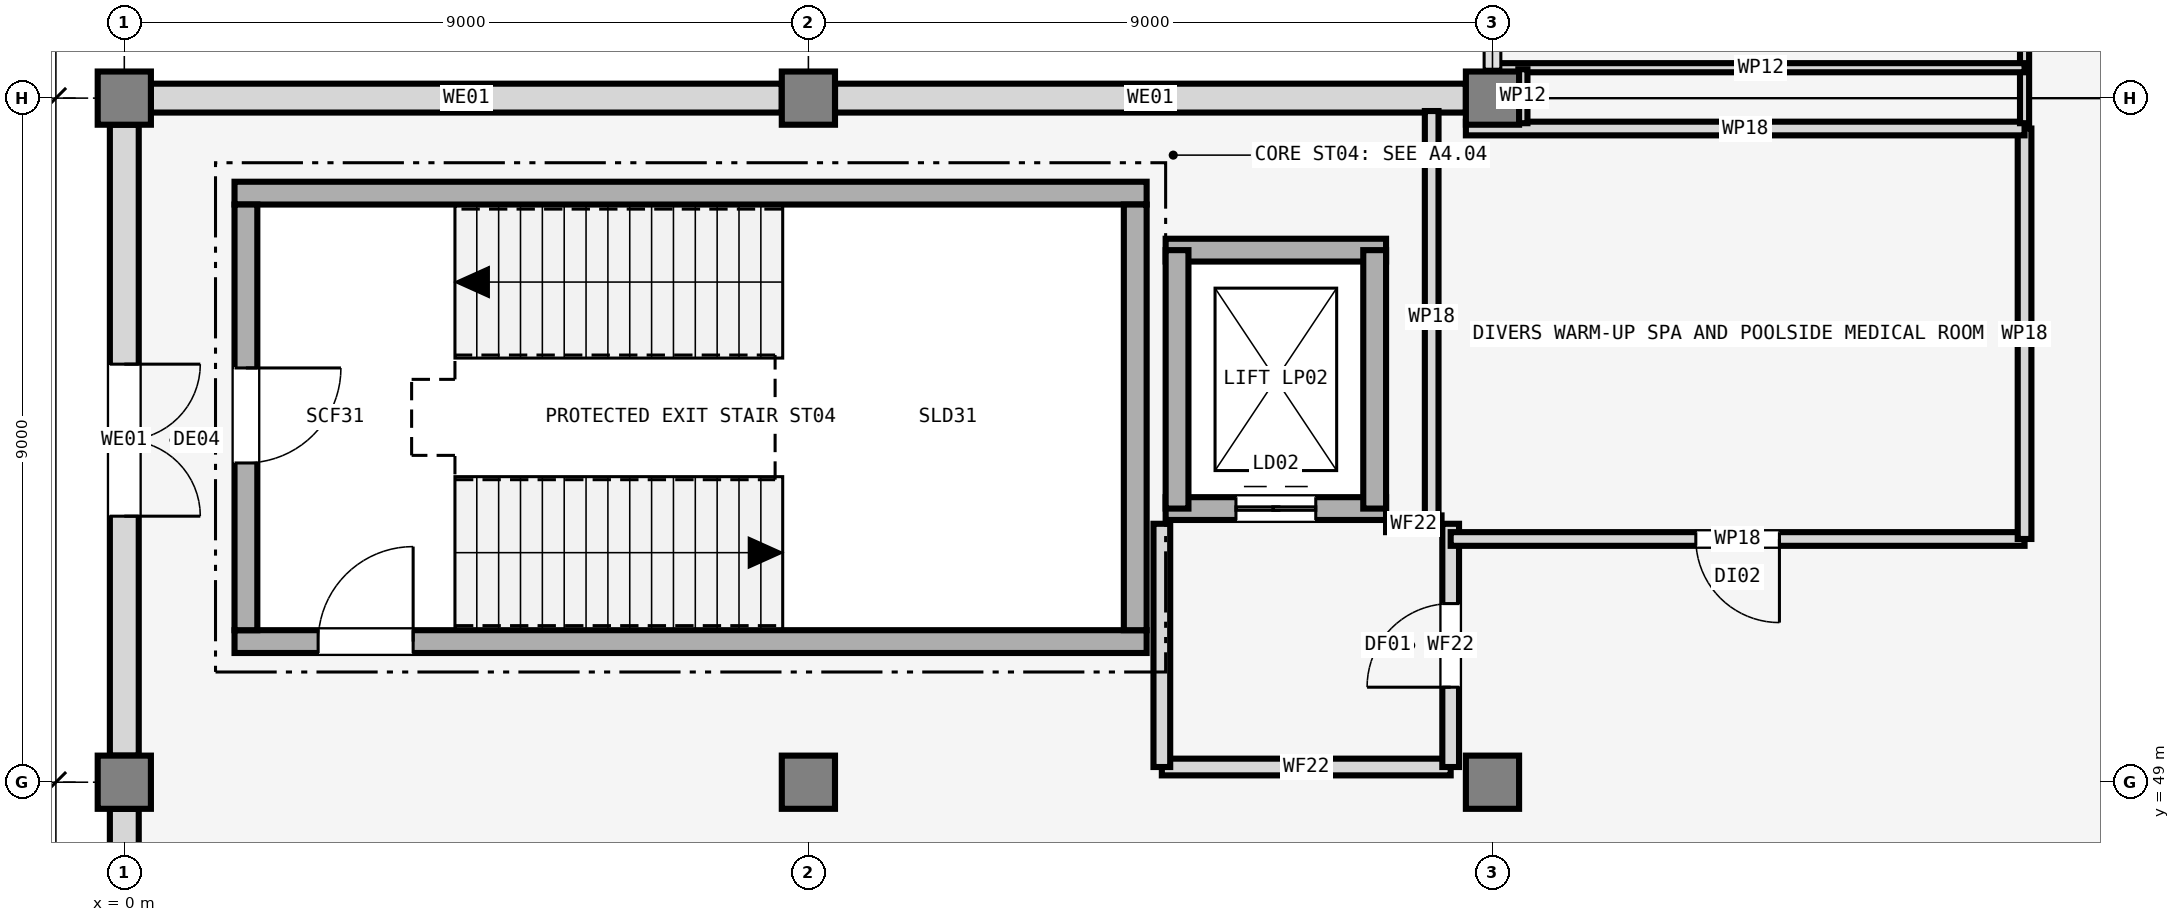
"""IFC4 building model, lengths in metres.
Left out: names, types, materials, properties, quantities, classifications, styles, units other than length and angle.
Written with IfcOpenShell. Run it as: python <this file> out.ifc"""

import sys

from ifc_helpers import new_model, si_unit, direction, frame, frame_2d, origin, origin_2d, place, context, subcontext, project, spatial, rectangle, extrude, element, fill, save


model = new_model("IFC4")
c1 = context("Model", 3, precision=1e-05, world=origin(), true_north=direction((0.0, 1.0)))
c2 = subcontext(c1, "Body", "Model", "MODEL_VIEW")
j1 = project(units=[si_unit("LENGTHUNIT", "METRE"), si_unit("PLANEANGLEUNIT", "RADIAN")], contexts=[c1])
p1 = place(None, origin())
s1 = spatial("IfcSite", under=j1, at=p1, CompositionType="ELEMENT")
p2 = place(p1, origin())
s2 = spatial("IfcBuilding", under=s1, at=p2, CompositionType="ELEMENT")
p3 = place(p2, origin())
s3 = spatial("IfcBuildingStorey", under=s2, at=p3, CompositionType="ELEMENT", Elevation=0.0)
for number, where, z_axis, x_axis in (
    (1, (0.0, 49.0, 0.0), (0.0, 0.0, 1.0), (1.0, 0.0, 0.0)),
    (2, (0.0, 58.0, 0.0), (0.0, 0.0, 1.0), (1.0, 0.0, 0.0)),
    (3, (9.0, 49.0, 0.0), (0.0, 0.0, 1.0), (1.0, 0.0, 0.0)),
    (4, (9.0, 58.0, 0.0), (0.0, 0.0, 1.0), (1.0, 0.0, 0.0)),
    (5, (18.0, 49.0, 0.0), (0.0, 0.0, 1.0), (1.0, 0.0, 0.0)),
    (6, (18.0, 58.0, 0.0), (0.0, 0.0, 1.0), (1.0, 0.0, 0.0)),
):
    element("IfcColumn", number, at=place(p3, frame(where, z_axis=z_axis, x_axis=x_axis)), inside=s3, PredefinedType="COLUMN", context=c2, shape_type="SweptSolid", body=[
        extrude(rectangle(XDim=0.7, YDim=0.7, at=origin_2d()), origin(), (0.0, 0.0, 1.0), 4.8),
    ])
p4 = place(p3, frame((0.0, 48.65, 0.0), z_axis=(0.0, 0.0, 1.0), x_axis=(0.0, -1.0, 0.0)))
e7 = element("IfcWall", 7, at=p4, inside=s3, PredefinedType="SOLIDWALL", context=c2, shape_type="SweptSolid", body=[
    extrude(rectangle(XDim=8.3, YDim=0.38, at=frame_2d((4.15, 0.0))), origin(), (0.0, 0.0, 1.0), 3.73),
])
p5 = place(p3, frame((0.0, 57.65, 0.0), z_axis=(0.0, 0.0, 1.0), x_axis=(0.0, -1.0, 0.0)))
e8 = element("IfcWall", 8, at=p5, inside=s3, PredefinedType="SOLIDWALL", context=c2, shape_type="SweptSolid", body=[
    extrude(rectangle(XDim=8.3, YDim=0.38, at=frame_2d((4.15, 0.0))), origin(), (0.0, 0.0, 1.0), 3.73),
])
p6 = place(p5, frame((3.15, 0.0, 0.0)))
e9 = element("IfcOpeningElement", 9, at=p6, cuts=e8, PredefinedType="OPENING", context=c2, shape_type="SweptSolid", body=[
    extrude(rectangle(XDim=2.0, YDim=2.25, at=frame_2d((1.0, 1.125))), frame((0.0, 0.2, 0.0), z_axis=(0.0, -1.0, 0.0), x_axis=(1.0, 0.0, 0.0)), (0.0, 0.0, 1.0), 0.4),
])
for number, where, z_axis, x_axis in (
    (10, (8.65, 58.0, 0.0), (0.0, 0.0, 1.0), (-1.0, 0.0, 0.0)),
    (11, (17.65, 58.0, 0.0), (0.0, 0.0, 1.0), (-1.0, 0.0, 0.0)),
):
    element("IfcWall", number, at=place(p3, frame(where, z_axis=z_axis, x_axis=x_axis)), inside=s3, PredefinedType="SOLIDWALL", context=c2, shape_type="SweptSolid", body=[
        extrude(rectangle(XDim=8.3, YDim=0.38, at=frame_2d((4.15, 0.0))), origin(), (0.0, 0.0, 1.0), 3.93),
    ])
p7 = place(p3, frame((1.45, 50.85, 0.0), z_axis=(0.0, 0.0, 1.0), x_axis=(1.0, 0.0, 0.0)))
e12 = element("IfcWall", 12, at=p7, inside=s3, PredefinedType="SHEAR", context=c2, shape_type="SweptSolid", body=[
    extrude(rectangle(XDim=12.0, YDim=0.3, at=frame_2d((6.0, 0.0))), origin(), (0.0, 0.0, 1.0), 4.8),
])
p8 = place(p7, frame((1.1, 0.0, 0.0)))
e13 = element("IfcOpeningElement", 13, at=p8, cuts=e12, PredefinedType="OPENING", context=c2, shape_type="SweptSolid", body=[
    extrude(rectangle(XDim=1.25, YDim=2.15, at=frame_2d((0.625, 1.075))), frame((0.0, 0.16, 0.0), z_axis=(0.0, -1.0, 0.0), x_axis=(1.0, 0.0, 0.0)), (0.0, 0.0, 1.0), 0.32),
])
p9 = place(p3, frame((13.45, 56.75, 0.0), z_axis=(0.0, 0.0, 1.0), x_axis=(-1.0, 0.0, 0.0)))
e14 = element("IfcWall", 14, at=p9, inside=s3, PredefinedType="SHEAR", context=c2, shape_type="SweptSolid", body=[
    extrude(rectangle(XDim=12.0, YDim=0.3, at=frame_2d((6.0, 0.0))), origin(), (0.0, 0.0, 1.0), 4.8),
])
p10 = place(p3, frame((1.6, 56.6, 0.0), z_axis=(0.0, 0.0, 1.0), x_axis=(0.0, -1.0, 0.0)))
e15 = element("IfcWall", 15, at=p10, inside=s3, PredefinedType="SHEAR", context=c2, shape_type="SweptSolid", body=[
    extrude(rectangle(XDim=5.6, YDim=0.3, at=frame_2d((2.8, 0.0))), origin(), (0.0, 0.0, 1.0), 4.8),
])
p11 = place(p10, frame((2.15, 0.0, 0.0)))
e16 = element("IfcOpeningElement", 16, at=p11, cuts=e15, PredefinedType="OPENING", context=c2, shape_type="SweptSolid", body=[
    extrude(rectangle(XDim=1.25, YDim=2.15, at=frame_2d((0.625, 1.075))), frame((0.0, 0.16, 0.0), z_axis=(0.0, -1.0, 0.0), x_axis=(1.0, 0.0, 0.0)), (0.0, 0.0, 1.0), 0.32),
])
p12 = place(p3, frame((13.3, 51.0, 0.0), z_axis=(0.0, 0.0, 1.0), x_axis=(0.0, 1.0, 0.0)))
e17 = element("IfcWall", 17, at=p12, inside=s3, PredefinedType="SHEAR", context=c2, shape_type="SweptSolid", body=[
    extrude(rectangle(XDim=5.6, YDim=0.3, at=frame_2d((2.8, 0.0))), origin(), (0.0, 0.0, 1.0), 4.8),
])
p13 = place(p3, frame((13.7, 52.6, 0.0), z_axis=(0.0, 0.0, 1.0), x_axis=(1.0, 0.0, 0.0)))
e18 = element("IfcWall", 18, at=p13, inside=s3, PredefinedType="SHEAR", context=c2, shape_type="SweptSolid", body=[
    extrude(rectangle(XDim=2.9, YDim=0.3, at=frame_2d((1.45, 0.0))), origin(), (0.0, 0.0, 1.0), 4.8),
])
p14 = place(p13, frame((0.925, 0.0, 0.0)))
e19 = element("IfcOpeningElement", 19, at=p14, cuts=e18, PredefinedType="OPENING", context=c2, shape_type="SweptSolid", body=[
    extrude(rectangle(XDim=1.05, YDim=2.15, at=frame_2d((0.525, 1.075))), frame((0.0, 0.16, 0.0), z_axis=(0.0, -1.0, 0.0), x_axis=(1.0, 0.0, 0.0)), (0.0, 0.0, 1.0), 0.32),
])
p15 = place(p3, frame((16.6, 56.0, 0.0), z_axis=(0.0, 0.0, 1.0), x_axis=(-1.0, 0.0, 0.0)))
e20 = element("IfcWall", 20, at=p15, inside=s3, PredefinedType="SHEAR", context=c2, shape_type="SweptSolid", body=[
    extrude(rectangle(XDim=2.9, YDim=0.3, at=frame_2d((1.45, 0.0))), origin(), (0.0, 0.0, 1.0), 4.8),
])
for number, where, z_axis, x_axis in (
    (21, (13.85, 56.0, 0.0), (0.0, 0.0, 1.0), (0.0, -1.0, 0.0)),
    (22, (16.45, 52.6, 0.0), (0.0, 0.0, 1.0), (0.0, 1.0, 0.0)),
):
    element("IfcWall", number, at=place(p3, frame(where, z_axis=z_axis, x_axis=x_axis)), inside=s3, PredefinedType="SHEAR", context=c2, shape_type="SweptSolid", body=[
        extrude(rectangle(XDim=3.4, YDim=0.3, at=frame_2d((1.7, 0.0))), origin(), (0.0, 0.0, 1.0), 4.8),
    ])
p16 = place(p3, frame((13.65, 49.2, 0.0), z_axis=(0.0, 0.0, 1.0), x_axis=(1.0, 0.0, 0.0)))
e23 = element("IfcWall", 23, at=p16, inside=s3, PredefinedType="SOLIDWALL", context=c2, shape_type="SweptSolid", body=[
    extrude(rectangle(XDim=3.8, YDim=0.22, at=frame_2d((1.9, 0.0))), origin(), (0.0, 0.0, 1.0), 3.68),
])
p17 = place(p3, frame((13.65, 49.2, 0.0), z_axis=(0.0, 0.0, 1.0), x_axis=(0.0, 1.0, 0.0)))
e24 = element("IfcWall", 24, at=p17, inside=s3, PredefinedType="SOLIDWALL", context=c2, shape_type="SweptSolid", body=[
    extrude(rectangle(XDim=3.2, YDim=0.22, at=frame_2d((1.6, 0.0))), origin(), (0.0, 0.0, 1.0), 3.68),
])
p18 = place(p3, frame((17.45, 49.2, 0.0), z_axis=(0.0, 0.0, 1.0), x_axis=(0.0, 1.0, 0.0)))
e25 = element("IfcWall", 25, at=p18, inside=s3, PredefinedType="SOLIDWALL", context=c2, shape_type="SweptSolid", body=[
    extrude(rectangle(XDim=3.2, YDim=0.22, at=frame_2d((1.6, 0.0))), origin(), (0.0, 0.0, 1.0), 3.68),
])
p19 = place(p18, frame((1.05, 0.0, 0.0)))
e26 = element("IfcOpeningElement", 26, at=p19, cuts=e25, PredefinedType="OPENING", context=c2, shape_type="SweptSolid", body=[
    extrude(rectangle(XDim=1.1, YDim=2.15, at=frame_2d((0.55, 1.075))), frame((0.0, 0.12, 0.0), z_axis=(0.0, -1.0, 0.0), x_axis=(1.0, 0.0, 0.0)), (0.0, 0.0, 1.0), 0.24),
])
p20 = place(p3, frame((16.6, 52.4, 0.0), z_axis=(0.0, 0.0, 1.0), x_axis=(1.0, 0.0, 0.0)))
e27 = element("IfcWall", 27, at=p20, inside=s3, PredefinedType="SOLIDWALL", context=c2, shape_type="SweptSolid", body=[
    extrude(rectangle(XDim=0.73, YDim=0.22, at=frame_2d((0.365, 0.0))), origin(), (0.0, 0.0, 1.0), 3.68),
])
p21 = place(p3, frame((25.0, 52.2, 0.0), z_axis=(0.0, 0.0, 1.0), x_axis=(-1.0, 0.0, 0.0)))
e28 = element("IfcWall", 28, at=p21, inside=s3, PredefinedType="PARTITIONING", context=c2, shape_type="SweptSolid", body=[
    extrude(rectangle(XDim=7.55, YDim=0.18, at=frame_2d((3.775, 0.0))), origin(), (0.0, 0.0, 1.0), 3.68),
])
p22 = place(p21, frame((3.225, 0.0, 0.0)))
e29 = element("IfcOpeningElement", 29, at=p22, cuts=e28, PredefinedType="OPENING", context=c2, shape_type="SweptSolid", body=[
    extrude(rectangle(XDim=1.1, YDim=2.1, at=frame_2d((0.55, 1.05))), frame((0.0, 0.1, 0.0), z_axis=(0.0, -1.0, 0.0), x_axis=(1.0, 0.0, 0.0)), (0.0, 0.0, 1.0), 0.2),
])
p23 = place(p3, frame((25.0, 57.6, 0.0), z_axis=(0.0, 0.0, 1.0), x_axis=(0.0, -1.0, 0.0)))
e30 = element("IfcWall", 30, at=p23, inside=s3, PredefinedType="PARTITIONING", context=c2, shape_type="SweptSolid", body=[
    extrude(rectangle(XDim=5.4, YDim=0.18, at=frame_2d((2.7, 0.0))), origin(), (0.0, 0.0, 1.0), 3.68),
])
p24 = place(p3, frame((17.2, 52.4, 0.0), z_axis=(0.0, 0.0, 1.0), x_axis=(0.0, 1.0, 0.0)))
e31 = element("IfcWall", 31, at=p24, inside=s3, PredefinedType="PARTITIONING", context=c2, shape_type="SweptSolid", body=[
    extrude(rectangle(XDim=5.43, YDim=0.18, at=frame_2d((2.715, 0.0))), origin(), (0.0, 0.0, 1.0), 3.68),
])
p25 = place(p3, frame((17.65, 57.6, 0.0), z_axis=(0.0, 0.0, 1.0), x_axis=(1.0, 0.0, 0.0)))
e32 = element("IfcWall", 32, at=p25, inside=s3, PredefinedType="PARTITIONING", context=c2, shape_type="SweptSolid", body=[
    extrude(rectangle(XDim=7.35, YDim=0.18, at=frame_2d((3.675, 0.0))), origin(), (0.0, 0.0, 1.0), 3.68),
])
p26 = place(p3, frame((25.0, 92.35, 0.0), z_axis=(0.0, 0.0, 1.0), x_axis=(0.0, -1.0, 0.0)))
e33 = element("IfcWall", 33, at=p26, inside=s3, PredefinedType="PARTITIONING", context=c2, shape_type="SweptSolid", body=[
    extrude(rectangle(XDim=34.68, YDim=0.12, at=frame_2d((17.34, 0.0))), origin(), (0.0, 0.0, 1.0), 3.68),
])
p27 = place(p26, frame((16.84, 0.0, 0.0)))
e34 = element("IfcOpeningElement", 34, at=p27, cuts=e33, PredefinedType="OPENING", context=c2, shape_type="SweptSolid", body=[
    extrude(rectangle(XDim=1.0, YDim=2.1, at=frame_2d((0.5, 1.05))), frame((0.0, 0.07, 0.0), z_axis=(0.0, -1.0, 0.0), x_axis=(1.0, 0.0, 0.0)), (0.0, 0.0, 1.0), 0.14),
])
p28 = place(p3, frame((25.0, 58.4, 0.0), z_axis=(0.0, 0.0, 1.0), x_axis=(-1.0, 0.0, 0.0)))
e35 = element("IfcWall", 35, at=p28, inside=s3, PredefinedType="PARTITIONING", context=c2, shape_type="SweptSolid", body=[
    extrude(rectangle(XDim=6.938, YDim=0.12, at=frame_2d((3.469, 0.0))), origin(), (0.0, 0.0, 1.0), 3.68),
])
p29 = place(p3, frame((18.4, 57.67, 0.0), z_axis=(0.0, 0.0, 1.0), x_axis=(0.0, 1.0, 0.0)))
e36 = element("IfcWall", 36, at=p29, inside=s3, PredefinedType="PARTITIONING", context=c2, shape_type="SweptSolid", body=[
    extrude(rectangle(XDim=0.71, YDim=0.12, at=frame_2d((0.355, 0.0))), origin(), (0.0, 0.0, 1.0), 3.68),
])
p30 = place(p6, frame((2.0, 0.0, 0.0), z_axis=(0.0, 0.0, 1.0), x_axis=(-1.0, 0.0, 0.0)))
e37 = element("IfcDoor", 37, at=p30, inside=s3, OperationType="DOUBLE_DOOR_SINGLE_SWING", PredefinedType="DOOR", context=c2, shape_type="SweptSolid", body=[
    extrude(rectangle(XDim=2.0, YDim=2.25, at=frame_2d((1.0, 1.125))), frame((0.0, 0.025, 0.0), z_axis=(0.0, -1.0, 0.0), x_axis=(1.0, 0.0, 0.0)), (0.0, 0.0, 1.0), 0.05),
])
fill(e9, e37)
p31 = place(p8, origin())
e38 = element("IfcDoor", 38, at=p31, inside=s3, OperationType="SINGLE_SWING_RIGHT", PredefinedType="DOOR", context=c2, shape_type="SweptSolid", body=[
    extrude(rectangle(XDim=1.25, YDim=2.15, at=frame_2d((0.625, 1.075))), frame((0.0, 0.025, 0.0), z_axis=(0.0, -1.0, 0.0), x_axis=(1.0, 0.0, 0.0)), (0.0, 0.0, 1.0), 0.05),
])
fill(e13, e38)
p32 = place(p11, origin())
e39 = element("IfcDoor", 39, at=p32, inside=s3, OperationType="SINGLE_SWING_LEFT", PredefinedType="DOOR", context=c2, shape_type="SweptSolid", body=[
    extrude(rectangle(XDim=1.25, YDim=2.15, at=frame_2d((0.625, 1.075))), frame((0.0, 0.025, 0.0), z_axis=(0.0, -1.0, 0.0), x_axis=(1.0, 0.0, 0.0)), (0.0, 0.0, 1.0), 0.05),
])
fill(e16, e39)
p33 = place(p14, origin())
e40 = element("IfcDoor", 40, at=p33, inside=s3, OperationType="DOUBLE_DOOR_SLIDING", PredefinedType="DOOR", context=c2, shape_type="SweptSolid", body=[
    extrude(rectangle(XDim=1.05, YDim=2.15, at=frame_2d((0.525, 1.075))), frame((0.0, 0.025, 0.0), z_axis=(0.0, -1.0, 0.0), x_axis=(1.0, 0.0, 0.0)), (0.0, 0.0, 1.0), 0.05),
])
fill(e19, e40)
p34 = place(p19, origin())
e41 = element("IfcDoor", 41, at=p34, inside=s3, OperationType="SINGLE_SWING_LEFT", PredefinedType="DOOR", context=c2, shape_type="SweptSolid", body=[
    extrude(rectangle(XDim=1.1, YDim=2.15, at=frame_2d((0.55, 1.075))), frame((0.0, 0.025, 0.0), z_axis=(0.0, -1.0, 0.0), x_axis=(1.0, 0.0, 0.0)), (0.0, 0.0, 1.0), 0.05),
])
fill(e26, e41)
p35 = place(p22, origin())
e42 = element("IfcDoor", 42, at=p35, inside=s3, OperationType="SINGLE_SWING_LEFT", PredefinedType="DOOR", context=c2, shape_type="SweptSolid", body=[
    extrude(rectangle(XDim=1.1, YDim=2.1, at=frame_2d((0.55, 1.05))), frame((0.0, 0.025, 0.0), z_axis=(0.0, -1.0, 0.0), x_axis=(1.0, 0.0, 0.0)), (0.0, 0.0, 1.0), 0.05),
])
fill(e29, e42)
save(model, sys.argv[1])
